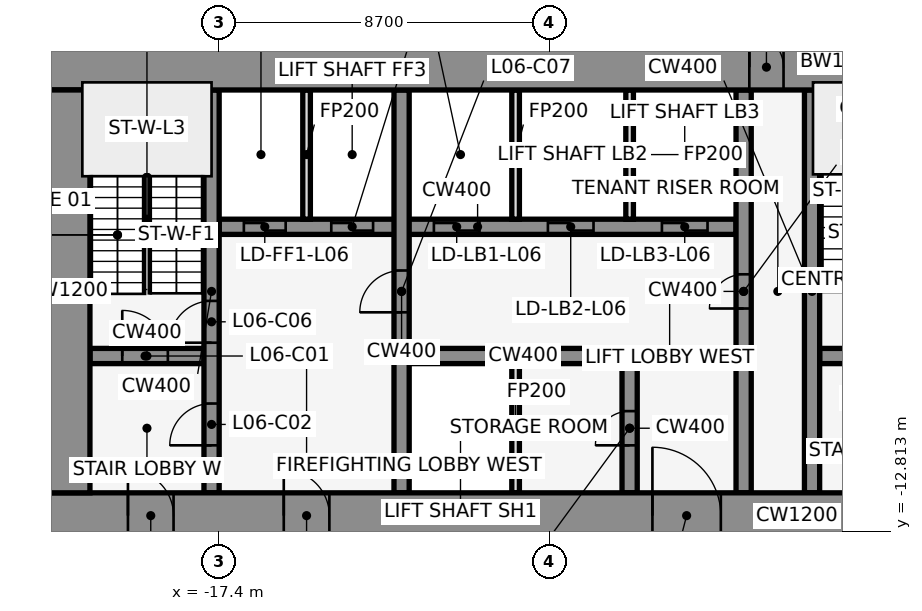
"""IFC4 building model, lengths in metres.
Left out: names, types, materials, properties, quantities, classifications, styles, units other than length and angle.
Written with IfcOpenShell. Run it as: python <this file> out.ifc"""

import sys

from ifc_helpers import new_model, si_unit, direction, frame, frame_2d, origin, place, context, subcontext, project, spatial, rectangle, extrude, element, fill, save


model = new_model("IFC4")
c1 = context("Model", 3, precision=1e-05, world=origin(), true_north=direction((0.0, 1.0)))
c2 = subcontext(c1, "Body", "Model", "MODEL_VIEW")
j1 = project(units=[si_unit("LENGTHUNIT", "METRE"), si_unit("PLANEANGLEUNIT", "RADIAN")], contexts=[c1])
p1 = place(None, origin())
s1 = spatial("IfcSite", under=j1, at=p1, CompositionType="ELEMENT")
p2 = place(p1, origin())
s2 = spatial("IfcBuilding", under=s1, at=p2, CompositionType="ELEMENT")
p3 = place(p2, frame((0.0, 0.0, 35.0)))
s3 = spatial("IfcBuildingStorey", under=s2, at=p3, CompositionType="ELEMENT", Elevation=35.0)
for number, where, z_axis, x_axis in (
    (1, (-0.068, -0.105, 0.0), (0.0, 0.0, 1.0), (-0.84, 0.543, 0.0)),
    (2, (-14.599, 1.08, 0.0), (0.0, 0.0, 1.0), (-0.84, -0.543, 0.0)),
):
    element("IfcWall", number, at=place(p3, frame(where, z_axis=z_axis, x_axis=x_axis)), inside=s3, PredefinedType="STANDARD", context=c2, shape_type="SweptSolid", body=[
        extrude(rectangle(XDim=2.183, YDim=0.25, at=frame_2d((1.091, 0.0))), origin(), (0.0, 0.0, 1.0), 4.35),
    ])
p4 = place(p3, frame((-20.8, -8.2, 0.0), z_axis=(0.0, 0.0, 1.0), x_axis=(1.0, 0.0, 0.0)))
e3 = element("IfcWall", 3, at=p4, inside=s3, PredefinedType="SHEAR", context=c2, shape_type="SweptSolid", body=[
    extrude(rectangle(XDim=3.0, YDim=0.4, at=frame_2d((1.5, 0.0))), origin(), (0.0, 0.0, 1.0), 4.5),
])
p5 = place(p4, frame((0.85, 0.0, 0.0)))
e4 = element("IfcOpeningElement", 4, at=p5, cuts=e3, PredefinedType="OPENING", context=c2, shape_type="SweptSolid", body=[
    extrude(rectangle(XDim=1.2, YDim=2.1, at=frame_2d((0.6, 1.05))), frame((0.0, 0.212, 0.0), z_axis=(0.0, -1.0, 0.0), x_axis=(1.0, 0.0, 0.0)), (0.0, 0.0, 1.0), 0.424),
])
p6 = place(p3, frame((-12.4, -8.2, 0.0), z_axis=(0.0, 0.0, 1.0), x_axis=(1.0, 0.0, 0.0)))
e5 = element("IfcWall", 5, at=p6, inside=s3, PredefinedType="SHEAR", context=c2, shape_type="SweptSolid", body=[
    extrude(rectangle(XDim=6.0, YDim=0.4, at=frame_2d((3.0, 0.0))), origin(), (0.0, 0.0, 1.0), 4.5),
])
p7 = place(p3, frame((-1.6, -8.2, 0.0), z_axis=(0.0, 0.0, 1.0), x_axis=(1.0, 0.0, 0.0)))
e6 = element("IfcWall", 6, at=p7, inside=s3, PredefinedType="SHEAR", context=c2, shape_type="SweptSolid", body=[
    extrude(rectangle(XDim=3.2, YDim=0.4, at=frame_2d((1.6, 0.0))), origin(), (0.0, 0.0, 1.0), 4.5),
])
p8 = place(p7, frame((1.05, 0.0, 0.0)))
e7 = element("IfcOpeningElement", 7, at=p8, cuts=e6, PredefinedType="OPENING", context=c2, shape_type="SweptSolid", body=[
    extrude(rectangle(XDim=1.2, YDim=2.1, at=frame_2d((0.6, 1.05))), frame((0.0, 0.212, 0.0), z_axis=(0.0, -1.0, 0.0), x_axis=(1.0, 0.0, 0.0)), (0.0, 0.0, 1.0), 0.424),
])
p9 = place(p3, frame((-17.4, -4.8, 0.0), z_axis=(0.0, 0.0, 1.0), x_axis=(1.0, 0.0, 0.0)))
e8 = element("IfcWall", 8, at=p9, inside=s3, PredefinedType="SHEAR", context=c2, shape_type="SweptSolid", body=[
    extrude(rectangle(XDim=13.6, YDim=0.4, at=frame_2d((6.8, 0.0))), origin(), (0.0, 0.0, 1.0), 4.5),
])
p10 = place(p9, frame((0.65, 0.0, 0.0)))
e9 = element("IfcOpeningElement", 9, at=p10, cuts=e8, PredefinedType="OPENING", context=c2, shape_type="SweptSolid", body=[
    extrude(rectangle(XDim=1.1, YDim=2.1, at=frame_2d((0.55, 1.05))), frame((0.0, 0.212, 0.0), z_axis=(0.0, -1.0, 0.0), x_axis=(1.0, 0.0, 0.0)), (0.0, 0.0, 1.0), 0.424),
])
p11 = place(p9, frame((2.95, 0.0, 0.0)))
e10 = element("IfcOpeningElement", 10, at=p11, cuts=e8, PredefinedType="OPENING", context=c2, shape_type="SweptSolid", body=[
    extrude(rectangle(XDim=1.1, YDim=2.1, at=frame_2d((0.55, 1.05))), frame((0.0, 0.212, 0.0), z_axis=(0.0, -1.0, 0.0), x_axis=(1.0, 0.0, 0.0)), (0.0, 0.0, 1.0), 0.424),
])
p12 = place(p9, frame((5.65, 0.0, 0.0)))
e11 = element("IfcOpeningElement", 11, at=p12, cuts=e8, PredefinedType="OPENING", context=c2, shape_type="SweptSolid", body=[
    extrude(rectangle(XDim=1.2, YDim=2.1, at=frame_2d((0.6, 1.05))), frame((0.0, 0.212, 0.0), z_axis=(0.0, -1.0, 0.0), x_axis=(1.0, 0.0, 0.0)), (0.0, 0.0, 1.0), 0.424),
])
p13 = place(p9, frame((8.65, 0.0, 0.0)))
e12 = element("IfcOpeningElement", 12, at=p13, cuts=e8, PredefinedType="OPENING", context=c2, shape_type="SweptSolid", body=[
    extrude(rectangle(XDim=1.2, YDim=2.1, at=frame_2d((0.6, 1.05))), frame((0.0, 0.212, 0.0), z_axis=(0.0, -1.0, 0.0), x_axis=(1.0, 0.0, 0.0)), (0.0, 0.0, 1.0), 0.424),
])
p14 = place(p9, frame((11.65, 0.0, 0.0)))
e13 = element("IfcOpeningElement", 13, at=p14, cuts=e8, PredefinedType="OPENING", context=c2, shape_type="SweptSolid", body=[
    extrude(rectangle(XDim=1.2, YDim=2.1, at=frame_2d((0.6, 1.05))), frame((0.0, 0.212, 0.0), z_axis=(0.0, -1.0, 0.0), x_axis=(1.0, 0.0, 0.0)), (0.0, 0.0, 1.0), 0.424),
])
p15 = place(p3, frame((-17.6, -11.8, 0.0), z_axis=(0.0, 0.0, 1.0), x_axis=(0.0, 1.0, 0.0)))
e14 = element("IfcWall", 14, at=p15, inside=s3, PredefinedType="SHEAR", context=c2, shape_type="SweptSolid", body=[
    extrude(rectangle(XDim=10.6, YDim=0.4, at=frame_2d((5.3, 0.0))), origin(), (0.0, 0.0, 1.0), 4.5),
])
p16 = place(p15, frame((1.25, 0.0, 0.0)))
e15 = element("IfcOpeningElement", 15, at=p16, cuts=e14, PredefinedType="OPENING", context=c2, shape_type="SweptSolid", body=[
    extrude(rectangle(XDim=1.1, YDim=2.1, at=frame_2d((0.55, 1.05))), frame((0.0, 0.212, 0.0), z_axis=(0.0, -1.0, 0.0), x_axis=(1.0, 0.0, 0.0)), (0.0, 0.0, 1.0), 0.424),
])
p17 = place(p15, frame((3.95, 0.0, 0.0)))
e16 = element("IfcOpeningElement", 16, at=p17, cuts=e14, PredefinedType="OPENING", context=c2, shape_type="SweptSolid", body=[
    extrude(rectangle(XDim=1.1, YDim=2.1, at=frame_2d((0.55, 1.05))), frame((0.0, 0.212, 0.0), z_axis=(0.0, -1.0, 0.0), x_axis=(1.0, 0.0, 0.0)), (0.0, 0.0, 1.0), 0.424),
])
p18 = place(p3, frame((-15.1, -4.6, 0.0), z_axis=(0.0, 0.0, 1.0), x_axis=(0.0, 1.0, 0.0)))
e17 = element("IfcWall", 17, at=p18, inside=s3, PredefinedType="PARTITIONING", context=c2, shape_type="SweptSolid", body=[
    extrude(rectangle(XDim=3.4, YDim=0.2, at=frame_2d((1.7, 0.0))), origin(), (0.0, 0.0, 1.0), 3.36),
])
p19 = place(p3, frame((-12.6, -11.8, 0.0), z_axis=(0.0, 0.0, 1.0), x_axis=(0.0, 1.0, 0.0)))
e18 = element("IfcWall", 18, at=p19, inside=s3, PredefinedType="SHEAR", context=c2, shape_type="SweptSolid", body=[
    extrude(rectangle(XDim=10.6, YDim=0.4, at=frame_2d((5.3, 0.0))), origin(), (0.0, 0.0, 1.0), 4.5),
])
p20 = place(p19, frame((4.75, 0.0, 0.0)))
e19 = element("IfcOpeningElement", 19, at=p20, cuts=e18, PredefinedType="OPENING", context=c2, shape_type="SweptSolid", body=[
    extrude(rectangle(XDim=1.1, YDim=2.1, at=frame_2d((0.55, 1.05))), frame((0.0, 0.212, 0.0), z_axis=(0.0, -1.0, 0.0), x_axis=(1.0, 0.0, 0.0)), (0.0, 0.0, 1.0), 0.424),
])
for number, where, z_axis, x_axis in (
    (20, (-9.6, -11.8, 0.0), (0.0, 0.0, 1.0), (0.0, 1.0, 0.0)),
    (21, (-9.6, -4.6, 0.0), (0.0, 0.0, 1.0), (0.0, 1.0, 0.0)),
):
    element("IfcWall", number, at=place(p3, frame(where, z_axis=z_axis, x_axis=x_axis)), inside=s3, PredefinedType="PARTITIONING", context=c2, shape_type="SweptSolid", body=[
        extrude(rectangle(XDim=3.4, YDim=0.2, at=frame_2d((1.7, 0.0))), origin(), (0.0, 0.0, 1.0), 3.36),
    ])
p21 = place(p3, frame((-6.6, -11.8, 0.0), z_axis=(0.0, 0.0, 1.0), x_axis=(0.0, 1.0, 0.0)))
e22 = element("IfcWall", 22, at=p21, inside=s3, PredefinedType="SHEAR", context=c2, shape_type="SweptSolid", body=[
    extrude(rectangle(XDim=3.4, YDim=0.4, at=frame_2d((1.7, 0.0))), origin(), (0.0, 0.0, 1.0), 4.5),
])
p22 = place(p21, frame((1.25, 0.0, 0.0)))
e23 = element("IfcOpeningElement", 23, at=p22, cuts=e22, PredefinedType="OPENING", context=c2, shape_type="SweptSolid", body=[
    extrude(rectangle(XDim=0.9, YDim=2.1, at=frame_2d((0.45, 1.05))), frame((0.0, 0.212, 0.0), z_axis=(0.0, -1.0, 0.0), x_axis=(1.0, 0.0, 0.0)), (0.0, 0.0, 1.0), 0.424),
])
p23 = place(p3, frame((-6.6, -4.6, 0.0), z_axis=(0.0, 0.0, 1.0), x_axis=(0.0, 1.0, 0.0)))
e24 = element("IfcWall", 24, at=p23, inside=s3, PredefinedType="PARTITIONING", context=c2, shape_type="SweptSolid", body=[
    extrude(rectangle(XDim=3.4, YDim=0.2, at=frame_2d((1.7, 0.0))), origin(), (0.0, 0.0, 1.0), 3.36),
])
p24 = place(p3, frame((-3.6, -11.8, 0.0), z_axis=(0.0, 0.0, 1.0), x_axis=(0.0, 1.0, 0.0)))
e25 = element("IfcWall", 25, at=p24, inside=s3, PredefinedType="SHEAR", context=c2, shape_type="SweptSolid", body=[
    extrude(rectangle(XDim=10.6, YDim=0.4, at=frame_2d((5.3, 0.0))), origin(), (0.0, 0.0, 1.0), 4.5),
])
p25 = place(p24, frame((4.85, 0.0, 0.0)))
e26 = element("IfcOpeningElement", 26, at=p25, cuts=e25, PredefinedType="OPENING", context=c2, shape_type="SweptSolid", body=[
    extrude(rectangle(XDim=0.9, YDim=2.1, at=frame_2d((0.45, 1.05))), frame((0.0, 0.212, 0.0), z_axis=(0.0, -1.0, 0.0), x_axis=(1.0, 0.0, 0.0)), (0.0, 0.0, 1.0), 0.424),
])
p26 = place(p3, frame((-1.8, -11.8, 0.0), z_axis=(0.0, 0.0, 1.0), x_axis=(0.0, 1.0, 0.0)))
e27 = element("IfcWall", 27, at=p26, inside=s3, PredefinedType="SHEAR", context=c2, shape_type="SweptSolid", body=[
    extrude(rectangle(XDim=10.6, YDim=0.4, at=frame_2d((5.3, 0.0))), origin(), (0.0, 0.0, 1.0), 4.5),
])
p27 = place(p3, frame((-22.0, -0.6, 0.0), z_axis=(0.0, 0.0, 1.0), x_axis=(1.0, 0.0, 0.0)))
e28 = element("IfcWall", 28, at=p27, inside=s3, PredefinedType="SHEAR", context=c2, shape_type="SweptSolid", body=[
    extrude(rectangle(XDim=44.0, YDim=1.2, at=frame_2d((22.0, 0.0))), origin(), (0.0, 0.0, 1.0), 4.5),
])
p28 = place(p27, frame((18.55, 0.0, 0.0)))
e29 = element("IfcOpeningElement", 29, at=p28, cuts=e28, PredefinedType="OPENING", context=c2, shape_type="SweptSolid", body=[
    extrude(rectangle(XDim=0.9, YDim=2.1, at=frame_2d((0.45, 1.05))), frame((0.0, 0.612, 0.0), z_axis=(0.0, -1.0, 0.0), x_axis=(1.0, 0.0, 0.0)), (0.0, 0.0, 1.0), 1.224),
])
p29 = place(p27, frame((24.55, 0.0, 0.0)))
e30 = element("IfcOpeningElement", 30, at=p29, cuts=e28, PredefinedType="OPENING", context=c2, shape_type="SweptSolid", body=[
    extrude(rectangle(XDim=0.9, YDim=2.1, at=frame_2d((0.45, 1.05))), frame((0.0, 0.612, 0.0), z_axis=(0.0, -1.0, 0.0), x_axis=(1.0, 0.0, 0.0)), (0.0, 0.0, 1.0), 1.224),
])
p30 = place(p3, frame((-22.0, -12.4, 0.0), z_axis=(0.0, 0.0, 1.0), x_axis=(1.0, 0.0, 0.0)))
e31 = element("IfcWall", 31, at=p30, inside=s3, PredefinedType="SHEAR", context=c2, shape_type="SweptSolid", body=[
    extrude(rectangle(XDim=44.0, YDim=1.2, at=frame_2d((22.0, 0.0))), origin(), (0.0, 0.0, 1.0), 4.5),
])
p31 = place(p30, frame((2.2, 0.0, 0.0)))
e32 = element("IfcOpeningElement", 32, at=p31, cuts=e31, PredefinedType="OPENING", context=c2, shape_type="SweptSolid", body=[
    extrude(rectangle(XDim=1.2, YDim=2.1, at=frame_2d((0.6, 1.05))), frame((0.0, 0.612, 0.0), z_axis=(0.0, -1.0, 0.0), x_axis=(1.0, 0.0, 0.0)), (0.0, 0.0, 1.0), 1.224),
])
p32 = place(p30, frame((21.4, 0.0, 0.0)))
e33 = element("IfcOpeningElement", 33, at=p32, cuts=e31, PredefinedType="OPENING", context=c2, shape_type="SweptSolid", body=[
    extrude(rectangle(XDim=1.2, YDim=2.1, at=frame_2d((0.6, 1.05))), frame((0.0, 0.612, 0.0), z_axis=(0.0, -1.0, 0.0), x_axis=(1.0, 0.0, 0.0)), (0.0, 0.0, 1.0), 1.224),
])
p33 = place(p30, frame((40.6, 0.0, 0.0)))
e34 = element("IfcOpeningElement", 34, at=p33, cuts=e31, PredefinedType="OPENING", context=c2, shape_type="SweptSolid", body=[
    extrude(rectangle(XDim=1.2, YDim=2.1, at=frame_2d((0.6, 1.05))), frame((0.0, 0.612, 0.0), z_axis=(0.0, -1.0, 0.0), x_axis=(1.0, 0.0, 0.0)), (0.0, 0.0, 1.0), 1.224),
])
p34 = place(p30, frame((16.0, 0.0, 0.0)))
e35 = element("IfcOpeningElement", 35, at=p34, cuts=e31, PredefinedType="OPENING", context=c2, shape_type="SweptSolid", body=[
    extrude(rectangle(XDim=1.8, YDim=2.1, at=frame_2d((0.9, 1.05))), frame((0.0, 0.612, 0.0), z_axis=(0.0, -1.0, 0.0), x_axis=(1.0, 0.0, 0.0)), (0.0, 0.0, 1.0), 1.224),
])
p35 = place(p30, frame((6.3, 0.0, 0.0)))
e36 = element("IfcOpeningElement", 36, at=p35, cuts=e31, PredefinedType="OPENING", context=c2, shape_type="SweptSolid", body=[
    extrude(rectangle(XDim=1.2, YDim=2.1, at=frame_2d((0.6, 1.05))), frame((0.0, 0.612, 0.0), z_axis=(0.0, -1.0, 0.0), x_axis=(1.0, 0.0, 0.0)), (0.0, 0.0, 1.0), 1.224),
])
p36 = place(p30, frame((26.2, 0.0, 0.0)))
e37 = element("IfcOpeningElement", 37, at=p36, cuts=e31, PredefinedType="OPENING", context=c2, shape_type="SweptSolid", body=[
    extrude(rectangle(XDim=1.8, YDim=2.1, at=frame_2d((0.9, 1.05))), frame((0.0, 0.612, 0.0), z_axis=(0.0, -1.0, 0.0), x_axis=(1.0, 0.0, 0.0)), (0.0, 0.0, 1.0), 1.224),
])
p37 = place(p30, frame((36.5, 0.0, 0.0)))
e38 = element("IfcOpeningElement", 38, at=p37, cuts=e31, PredefinedType="OPENING", context=c2, shape_type="SweptSolid", body=[
    extrude(rectangle(XDim=1.2, YDim=2.1, at=frame_2d((0.6, 1.05))), frame((0.0, 0.612, 0.0), z_axis=(0.0, -1.0, 0.0), x_axis=(1.0, 0.0, 0.0)), (0.0, 0.0, 1.0), 1.224),
])
p38 = place(p3, frame((-21.4, -11.8, 0.0), z_axis=(0.0, 0.0, 1.0), x_axis=(0.0, 1.0, 0.0)))
e39 = element("IfcWall", 39, at=p38, inside=s3, PredefinedType="SHEAR", context=c2, shape_type="SweptSolid", body=[
    extrude(rectangle(XDim=10.6, YDim=1.2, at=frame_2d((5.3, 0.0))), origin(), (0.0, 0.0, 1.0), 4.5),
])
p39 = place(p5, origin())
e40 = element("IfcDoor", 40, at=p39, inside=s3, OperationType="SINGLE_SWING_LEFT", PredefinedType="DOOR", context=c2, shape_type="SweptSolid", body=[
    extrude(rectangle(XDim=1.2, YDim=2.1, at=frame_2d((0.6, 1.05))), frame((0.0, 0.025, 0.0), z_axis=(0.0, -1.0, 0.0), x_axis=(1.0, 0.0, 0.0)), (0.0, 0.0, 1.0), 0.05),
])
fill(e4, e40)
p40 = place(p16, frame((1.1, 0.0, 0.0), z_axis=(0.0, 0.0, 1.0), x_axis=(-1.0, 0.0, 0.0)))
e41 = element("IfcDoor", 41, at=p40, inside=s3, OperationType="SINGLE_SWING_LEFT", PredefinedType="DOOR", context=c2, shape_type="SweptSolid", body=[
    extrude(rectangle(XDim=1.1, YDim=2.1, at=frame_2d((0.55, 1.05))), frame((0.0, 0.025, 0.0), z_axis=(0.0, -1.0, 0.0), x_axis=(1.0, 0.0, 0.0)), (0.0, 0.0, 1.0), 0.05),
])
fill(e15, e41)
p41 = place(p10, origin())
e42 = element("IfcDoor", 42, at=p41, inside=s3, OperationType="DOUBLE_DOOR_SLIDING", PredefinedType="DOOR", context=c2, shape_type="SweptSolid", body=[
    extrude(rectangle(XDim=1.1, YDim=2.1, at=frame_2d((0.55, 1.05))), frame((0.0, 0.025, 0.0), z_axis=(0.0, -1.0, 0.0), x_axis=(1.0, 0.0, 0.0)), (0.0, 0.0, 1.0), 0.05),
])
fill(e9, e42)
p42 = place(p11, origin())
e43 = element("IfcDoor", 43, at=p42, inside=s3, OperationType="DOUBLE_DOOR_SLIDING", PredefinedType="DOOR", context=c2, shape_type="SweptSolid", body=[
    extrude(rectangle(XDim=1.1, YDim=2.1, at=frame_2d((0.55, 1.05))), frame((0.0, 0.025, 0.0), z_axis=(0.0, -1.0, 0.0), x_axis=(1.0, 0.0, 0.0)), (0.0, 0.0, 1.0), 0.05),
])
fill(e10, e43)
p43 = place(p12, origin())
e44 = element("IfcDoor", 44, at=p43, inside=s3, OperationType="DOUBLE_DOOR_SLIDING", PredefinedType="DOOR", context=c2, shape_type="SweptSolid", body=[
    extrude(rectangle(XDim=1.2, YDim=2.1, at=frame_2d((0.6, 1.05))), frame((0.0, 0.025, 0.0), z_axis=(0.0, -1.0, 0.0), x_axis=(1.0, 0.0, 0.0)), (0.0, 0.0, 1.0), 0.05),
])
fill(e11, e44)
p44 = place(p13, origin())
e45 = element("IfcDoor", 45, at=p44, inside=s3, OperationType="DOUBLE_DOOR_SLIDING", PredefinedType="DOOR", context=c2, shape_type="SweptSolid", body=[
    extrude(rectangle(XDim=1.2, YDim=2.1, at=frame_2d((0.6, 1.05))), frame((0.0, 0.025, 0.0), z_axis=(0.0, -1.0, 0.0), x_axis=(1.0, 0.0, 0.0)), (0.0, 0.0, 1.0), 0.05),
])
fill(e12, e45)
p45 = place(p14, origin())
e46 = element("IfcDoor", 46, at=p45, inside=s3, OperationType="DOUBLE_DOOR_SLIDING", PredefinedType="DOOR", context=c2, shape_type="SweptSolid", body=[
    extrude(rectangle(XDim=1.2, YDim=2.1, at=frame_2d((0.6, 1.05))), frame((0.0, 0.025, 0.0), z_axis=(0.0, -1.0, 0.0), x_axis=(1.0, 0.0, 0.0)), (0.0, 0.0, 1.0), 0.05),
])
fill(e13, e46)
p46 = place(p17, frame((1.1, 0.0, 0.0), z_axis=(0.0, 0.0, 1.0), x_axis=(-1.0, 0.0, 0.0)))
e47 = element("IfcDoor", 47, at=p46, inside=s3, OperationType="SINGLE_SWING_LEFT", PredefinedType="DOOR", context=c2, shape_type="SweptSolid", body=[
    extrude(rectangle(XDim=1.1, YDim=2.1, at=frame_2d((0.55, 1.05))), frame((0.0, 0.025, 0.0), z_axis=(0.0, -1.0, 0.0), x_axis=(1.0, 0.0, 0.0)), (0.0, 0.0, 1.0), 0.05),
])
fill(e16, e47)
p47 = place(p20, origin())
e48 = element("IfcDoor", 48, at=p47, inside=s3, OperationType="SINGLE_SWING_LEFT", PredefinedType="DOOR", context=c2, shape_type="SweptSolid", body=[
    extrude(rectangle(XDim=1.1, YDim=2.1, at=frame_2d((0.55, 1.05))), frame((0.0, 0.025, 0.0), z_axis=(0.0, -1.0, 0.0), x_axis=(1.0, 0.0, 0.0)), (0.0, 0.0, 1.0), 0.05),
])
fill(e19, e48)
p48 = place(p25, frame((0.9, 0.0, 0.0), z_axis=(0.0, 0.0, 1.0), x_axis=(-1.0, 0.0, 0.0)))
e49 = element("IfcDoor", 49, at=p48, inside=s3, OperationType="SINGLE_SWING_LEFT", PredefinedType="DOOR", context=c2, shape_type="SweptSolid", body=[
    extrude(rectangle(XDim=0.9, YDim=2.1, at=frame_2d((0.45, 1.05))), frame((0.0, 0.025, 0.0), z_axis=(0.0, -1.0, 0.0), x_axis=(1.0, 0.0, 0.0)), (0.0, 0.0, 1.0), 0.05),
])
fill(e26, e49)
p49 = place(p22, origin())
e50 = element("IfcDoor", 50, at=p49, inside=s3, OperationType="SINGLE_SWING_RIGHT", PredefinedType="DOOR", context=c2, shape_type="SweptSolid", body=[
    extrude(rectangle(XDim=0.9, YDim=2.1, at=frame_2d((0.45, 1.05))), frame((0.0, 0.025, 0.0), z_axis=(0.0, -1.0, 0.0), x_axis=(1.0, 0.0, 0.0)), (0.0, 0.0, 1.0), 0.05),
])
fill(e23, e50)
p50 = place(p28, origin())
e51 = element("IfcDoor", 51, at=p50, inside=s3, OperationType="SINGLE_SWING_LEFT", PredefinedType="DOOR", context=c2, shape_type="SweptSolid", body=[
    extrude(rectangle(XDim=0.9, YDim=2.1, at=frame_2d((0.45, 1.05))), frame((0.0, 0.025, 0.0), z_axis=(0.0, -1.0, 0.0), x_axis=(1.0, 0.0, 0.0)), (0.0, 0.0, 1.0), 0.05),
])
fill(e29, e51)
p51 = place(p31, frame((1.2, 0.0, 0.0), z_axis=(0.0, 0.0, 1.0), x_axis=(-1.0, 0.0, 0.0)))
e52 = element("IfcDoor", 52, at=p51, inside=s3, OperationType="SINGLE_SWING_RIGHT", PredefinedType="DOOR", context=c2, shape_type="SweptSolid", body=[
    extrude(rectangle(XDim=1.2, YDim=2.1, at=frame_2d((0.6, 1.05))), frame((0.0, 0.025, 0.0), z_axis=(0.0, -1.0, 0.0), x_axis=(1.0, 0.0, 0.0)), (0.0, 0.0, 1.0), 0.05),
])
fill(e32, e52)
p52 = place(p34, origin())
e53 = element("IfcDoor", 53, at=p52, inside=s3, OperationType="SINGLE_SWING_LEFT", PredefinedType="DOOR", context=c2, shape_type="SweptSolid", body=[
    extrude(rectangle(XDim=1.8, YDim=2.1, at=frame_2d((0.9, 1.05))), frame((0.0, 0.025, 0.0), z_axis=(0.0, -1.0, 0.0), x_axis=(1.0, 0.0, 0.0)), (0.0, 0.0, 1.0), 0.05),
])
fill(e35, e53)
p53 = place(p35, frame((1.2, 0.0, 0.0), z_axis=(0.0, 0.0, 1.0), x_axis=(-1.0, 0.0, 0.0)))
e54 = element("IfcDoor", 54, at=p53, inside=s3, OperationType="SINGLE_SWING_RIGHT", PredefinedType="DOOR", context=c2, shape_type="SweptSolid", body=[
    extrude(rectangle(XDim=1.2, YDim=2.1, at=frame_2d((0.6, 1.05))), frame((0.0, 0.025, 0.0), z_axis=(0.0, -1.0, 0.0), x_axis=(1.0, 0.0, 0.0)), (0.0, 0.0, 1.0), 0.05),
])
fill(e36, e54)
save(model, sys.argv[1])
